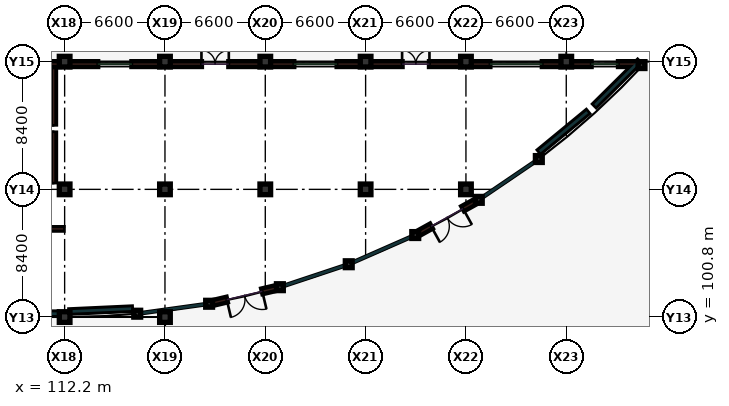
"""IFC4 building model, lengths in metres.
Left out: names, types, materials, properties, quantities, classifications, styles, units other than length and angle.
Written with IfcOpenShell. Run it as: python <this file> out.ifc"""

import sys

from ifc_helpers import new_model, si_unit, direction, frame, frame_2d, origin, origin_2d, place, context, subcontext, project, spatial, rectangle, extrude, element, fill, save


model = new_model("IFC4")
c1 = context("Model", 3, precision=1e-05, world=origin(), true_north=direction((0.0, 1.0)))
c2 = subcontext(c1, "Body", "Model", "MODEL_VIEW")
j1 = project(units=[si_unit("LENGTHUNIT", "METRE"), si_unit("PLANEANGLEUNIT", "RADIAN")], contexts=[c1])
p1 = place(None, origin())
s1 = spatial("IfcSite", under=j1, at=p1, CompositionType="ELEMENT")
p2 = place(p1, origin())
s2 = spatial("IfcBuilding", under=s1, at=p2, CompositionType="ELEMENT")
p3 = place(p2, origin())
s3 = spatial("IfcBuildingStorey", under=s2, at=p3, CompositionType="ELEMENT", Elevation=0.0)
for number, where, z_axis, x_axis in (
    (1, (112.2, 100.8, 0.0), (0.0, 0.0, 1.0), (1.0, 0.0, 0.0)),
    (2, (112.2, 109.2, 0.0), (0.0, 0.0, 1.0), (1.0, 0.0, 0.0)),
    (3, (112.2, 117.6, 0.0), (0.0, 0.0, 1.0), (1.0, 0.0, 0.0)),
    (4, (118.8, 100.8, 0.0), (0.0, 0.0, 1.0), (1.0, 0.0, 0.0)),
    (5, (118.8, 109.2, 0.0), (0.0, 0.0, 1.0), (1.0, 0.0, 0.0)),
    (6, (118.8, 117.6, 0.0), (0.0, 0.0, 1.0), (1.0, 0.0, 0.0)),
    (7, (125.4, 109.2, 0.0), (0.0, 0.0, 1.0), (1.0, 0.0, 0.0)),
    (8, (125.4, 117.6, 0.0), (0.0, 0.0, 1.0), (1.0, 0.0, 0.0)),
    (9, (132.0, 109.2, 0.0), (0.0, 0.0, 1.0), (1.0, 0.0, 0.0)),
    (10, (132.0, 117.6, 0.0), (0.0, 0.0, 1.0), (1.0, 0.0, 0.0)),
    (11, (138.6, 109.2, 0.0), (0.0, 0.0, 1.0), (1.0, 0.0, 0.0)),
    (12, (138.6, 117.6, 0.0), (0.0, 0.0, 1.0), (1.0, 0.0, 0.0)),
    (13, (145.2, 117.6, 0.0), (0.0, 0.0, 1.0), (1.0, 0.0, 0.0)),
):
    element("IfcColumn", number, at=place(p3, frame(where, z_axis=z_axis, x_axis=x_axis)), inside=s3, PredefinedType="COLUMN", context=c2, shape_type="SweptSolid", body=[
        extrude(rectangle(XDim=0.7, YDim=0.7, at=origin_2d()), origin(), (0.0, 0.0, 1.0), 5.4),
    ])
for number, where, z_axis, x_axis in (
    (14, (150.15, 117.375, 0.0), (0.0, 0.0, 1.0), (1.0, 0.0, 0.0)),
    (15, (116.975, 101.02, 0.0), (0.0, 0.0, 1.0), (1.0, 0.0, 0.0)),
    (16, (121.705, 101.675, 0.0), (0.0, 0.0, 1.0), (1.0, 0.0, 0.0)),
    (17, (126.36, 102.765, 0.0), (0.0, 0.0, 1.0), (1.0, 0.0, 0.0)),
    (18, (130.89, 104.275, 0.0), (0.0, 0.0, 1.0), (1.0, 0.0, 0.0)),
    (19, (135.265, 106.195, 0.0), (0.0, 0.0, 1.0), (1.0, 0.0, 0.0)),
    (20, (139.445, 108.51, 0.0), (0.0, 0.0, 1.0), (1.0, 0.0, 0.0)),
    (21, (143.395, 111.195, 0.0), (0.0, 0.0, 1.0), (1.0, 0.0, 0.0)),
):
    element("IfcColumn", number, at=place(p3, frame(where, z_axis=z_axis, x_axis=x_axis)), inside=s3, PredefinedType="COLUMN", context=c2, shape_type="SweptSolid", body=[
        extrude(rectangle(XDim=0.45, YDim=0.45, at=origin_2d()), origin(), (0.0, 0.0, 1.0), 5.4),
    ])
p4 = place(p3, frame((99.2, 106.6, 0.0), z_axis=(0.0, 0.0, 1.0), x_axis=(1.0, 0.0, 0.0)))
e22 = element("IfcWall", 22, at=p4, inside=s3, PredefinedType="PARTITIONING", context=c2, shape_type="SweptSolid", body=[
    extrude(rectangle(XDim=12.9, YDim=0.16, at=frame_2d((6.45, 0.0))), origin(), (0.0, 0.0, 1.0), 4.25),
])
p5 = place(p4, frame((4.2, 0.0, 0.0)))
e23 = element("IfcOpeningElement", 23, at=p5, cuts=e22, PredefinedType="OPENING", context=c2, shape_type="SweptSolid", body=[
    extrude(rectangle(XDim=1.05, YDim=2.15, at=frame_2d((0.525, 1.075))), frame((0.0, 0.09, 0.0), z_axis=(0.0, -1.0, 0.0), x_axis=(1.0, 0.0, 0.0)), (0.0, 0.0, 1.0), 0.18),
])
p6 = place(p3, frame((111.855, 117.44, 0.0), z_axis=(0.0, 0.0, 1.0), x_axis=(-1.0, 0.0, 0.0)))
e24 = element("IfcWall", 24, at=p6, inside=s3, PredefinedType="SOLIDWALL", context=c2, shape_type="SweptSolid", body=[
    extrude(rectangle(XDim=5.91, YDim=0.32, at=frame_2d((2.955, 0.0))), origin(), (0.0, 0.0, 1.0), 4.385),
])
p7 = place(p6, frame((3.15, 0.0, 0.95)))
e25 = element("IfcOpeningElement", 25, at=p7, cuts=e24, PredefinedType="OPENING", context=c2, shape_type="SweptSolid", body=[
    extrude(rectangle(XDim=1.95, YDim=1.55, at=frame_2d((0.975, 0.775))), frame((0.0, 0.17, 0.0), z_axis=(0.0, -1.0, 0.0), x_axis=(1.0, 0.0, 0.0)), (0.0, 0.0, 1.0), 0.34),
])
p8 = place(p3, frame((118.455, 117.44, 0.0), z_axis=(0.0, 0.0, 1.0), x_axis=(-1.0, 0.0, 0.0)))
e26 = element("IfcWall", 26, at=p8, inside=s3, PredefinedType="SOLIDWALL", context=c2, shape_type="SweptSolid", body=[
    extrude(rectangle(XDim=5.91, YDim=0.32, at=frame_2d((2.955, 0.0))), origin(), (0.0, 0.0, 1.0), 4.385),
])
p9 = place(p8, frame((1.83, 0.0, 0.95)))
e27 = element("IfcOpeningElement", 27, at=p9, cuts=e26, PredefinedType="OPENING", context=c2, shape_type="SweptSolid", body=[
    extrude(rectangle(XDim=2.25, YDim=1.55, at=frame_2d((1.125, 0.775))), frame((0.0, 0.17, 0.0), z_axis=(0.0, -1.0, 0.0), x_axis=(1.0, 0.0, 0.0)), (0.0, 0.0, 1.0), 0.34),
])
p10 = place(p3, frame((125.055, 117.44, 0.0), z_axis=(0.0, 0.0, 1.0), x_axis=(-1.0, 0.0, 0.0)))
e28 = element("IfcWall", 28, at=p10, inside=s3, PredefinedType="SOLIDWALL", context=c2, shape_type="SweptSolid", body=[
    extrude(rectangle(XDim=5.91, YDim=0.32, at=frame_2d((2.955, 0.0))), origin(), (0.0, 0.0, 1.0), 4.385),
])
p11 = place(p10, frame((2.055, 0.0, 0.0)))
e29 = element("IfcOpeningElement", 29, at=p11, cuts=e28, PredefinedType="OPENING", context=c2, shape_type="SweptSolid", body=[
    extrude(rectangle(XDim=1.8, YDim=2.2, at=frame_2d((0.9, 1.1))), frame((0.0, 0.17, 0.0), z_axis=(0.0, -1.0, 0.0), x_axis=(1.0, 0.0, 0.0)), (0.0, 0.0, 1.0), 0.34),
])
p12 = place(p3, frame((131.655, 117.44, 0.0), z_axis=(0.0, 0.0, 1.0), x_axis=(-1.0, 0.0, 0.0)))
e30 = element("IfcWall", 30, at=p12, inside=s3, PredefinedType="SOLIDWALL", context=c2, shape_type="SweptSolid", body=[
    extrude(rectangle(XDim=5.91, YDim=0.32, at=frame_2d((2.955, 0.0))), origin(), (0.0, 0.0, 1.0), 4.385),
])
p13 = place(p12, frame((1.53, 0.0, 0.95)))
e31 = element("IfcOpeningElement", 31, at=p13, cuts=e30, PredefinedType="OPENING", context=c2, shape_type="SweptSolid", body=[
    extrude(rectangle(XDim=2.85, YDim=1.65, at=frame_2d((1.425, 0.825))), frame((0.0, 0.17, 0.0), z_axis=(0.0, -1.0, 0.0), x_axis=(1.0, 0.0, 0.0)), (0.0, 0.0, 1.0), 0.34),
])
p14 = place(p3, frame((138.255, 117.44, 0.0), z_axis=(0.0, 0.0, 1.0), x_axis=(-1.0, 0.0, 0.0)))
e32 = element("IfcWall", 32, at=p14, inside=s3, PredefinedType="SOLIDWALL", context=c2, shape_type="SweptSolid", body=[
    extrude(rectangle(XDim=5.91, YDim=0.32, at=frame_2d((2.955, 0.0))), origin(), (0.0, 0.0, 1.0), 4.385),
])
p15 = place(p14, frame((2.055, 0.0, 0.0)))
e33 = element("IfcOpeningElement", 33, at=p15, cuts=e32, PredefinedType="OPENING", context=c2, shape_type="SweptSolid", body=[
    extrude(rectangle(XDim=1.8, YDim=2.2, at=frame_2d((0.9, 1.1))), frame((0.0, 0.17, 0.0), z_axis=(0.0, -1.0, 0.0), x_axis=(1.0, 0.0, 0.0)), (0.0, 0.0, 1.0), 0.34),
])
p16 = place(p3, frame((144.855, 117.44, 0.0), z_axis=(0.0, 0.0, 1.0), x_axis=(-1.0, 0.0, 0.0)))
e34 = element("IfcWall", 34, at=p16, inside=s3, PredefinedType="SOLIDWALL", context=c2, shape_type="SweptSolid", body=[
    extrude(rectangle(XDim=5.91, YDim=0.32, at=frame_2d((2.955, 0.0))), origin(), (0.0, 0.0, 1.0), 4.385),
])
p17 = place(p16, frame((1.23, 0.0, 0.95)))
e35 = element("IfcOpeningElement", 35, at=p17, cuts=e34, PredefinedType="OPENING", context=c2, shape_type="SweptSolid", body=[
    extrude(rectangle(XDim=3.45, YDim=1.7, at=frame_2d((1.725, 0.85))), frame((0.0, 0.17, 0.0), z_axis=(0.0, -1.0, 0.0), x_axis=(1.0, 0.0, 0.0)), (0.0, 0.0, 1.0), 0.34),
])
p18 = place(p3, frame((121.95, 101.73, 0.0), z_axis=(0.0, 0.0, 1.0), x_axis=(0.97341866493, 0.229032973097, 0.0)))
e36 = element("IfcWall", 36, at=p18, inside=s3, PredefinedType="SOLIDWALL", context=c2, shape_type="SweptSolid", body=[
    extrude(rectangle(XDim=4.279, YDim=0.32, at=frame_2d((2.139, 0.0))), origin(), (0.0, 0.0, 1.0), 5.04),
])
p19 = place(p18, frame((0.94, 0.0, 0.0)))
e37 = element("IfcOpeningElement", 37, at=p19, cuts=e36, PredefinedType="OPENING", context=c2, shape_type="SweptSolid", body=[
    extrude(rectangle(XDim=2.4, YDim=2.6, at=frame_2d((1.2, 1.3))), frame((0.0, 0.17, 0.0), z_axis=(0.0, -1.0, 0.0), x_axis=(1.0, 0.0, 0.0)), (0.0, 0.0, 1.0), 0.34),
])
p20 = place(p3, frame((135.485, 106.315, 0.0), z_axis=(0.0, 0.0, 1.0), x_axis=(0.874437155069, 0.485138806771, 0.0)))
e38 = element("IfcWall", 38, at=p20, inside=s3, PredefinedType="SOLIDWALL", context=c2, shape_type="SweptSolid", body=[
    extrude(rectangle(XDim=4.277, YDim=0.32, at=frame_2d((2.139, 0.0))), origin(), (0.0, 0.0, 1.0), 5.04),
])
p21 = place(p20, frame((0.94, 0.0, 0.0)))
e39 = element("IfcOpeningElement", 39, at=p21, cuts=e38, PredefinedType="OPENING", context=c2, shape_type="SweptSolid", body=[
    extrude(rectangle(XDim=2.4, YDim=2.6, at=frame_2d((1.2, 1.3))), frame((0.0, 0.17, 0.0), z_axis=(0.0, -1.0, 0.0), x_axis=(1.0, 0.0, 0.0)), (0.0, 0.0, 1.0), 0.34),
])
p22 = place(p3, frame((106.1, 101.02, 0.0), z_axis=(0.0, 0.0, 1.0), x_axis=(1.0, 0.0, 0.0)))
e40 = element("IfcWall", 40, at=p22, inside=s3, PredefinedType="SOLIDWALL", context=c2, shape_type="SweptSolid", body=[
    extrude(rectangle(XDim=5.6, YDim=0.22, at=frame_2d((2.8, 0.0))), origin(), (0.0, 0.0, 1.0), 0.85),
])
p23 = place(p3, frame((112.55, 101.165, 0.0), z_axis=(0.0, 0.0, 1.0), x_axis=(0.998952546821, 0.045758159928, 0.0)))
e41 = element("IfcWall", 41, at=p23, inside=s3, PredefinedType="SOLIDWALL", context=c2, shape_type="SweptSolid", body=[
    extrude(rectangle(XDim=4.044, YDim=0.22, at=frame_2d((2.022, 0.0))), origin(), (0.0, 0.0, 1.0), 0.85),
])
p24 = place(p3, frame((143.455, 111.7, 0.0), z_axis=(0.0, 0.0, 1.0), x_axis=(0.771757904354, 0.635916454471, 0.0)))
e42 = element("IfcWall", 42, at=p24, inside=s3, PredefinedType="SOLIDWALL", context=c2, shape_type="SweptSolid", body=[
    extrude(rectangle(XDim=4.049, YDim=0.22, at=frame_2d((2.025, 0.0))), origin(), (0.0, 0.0, 1.0), 0.85),
])
p25 = place(p3, frame((147.095, 114.74, 0.0), z_axis=(0.0, 0.0, 1.0), x_axis=(0.710175751401, 0.704024432902, 0.0)))
e43 = element("IfcWall", 43, at=p25, inside=s3, PredefinedType="SOLIDWALL", context=c2, shape_type="SweptSolid", body=[
    extrude(rectangle(XDim=4.048, YDim=0.22, at=frame_2d((2.024, 0.0))), origin(), (0.0, 0.0, 1.0), 0.85),
])
p26 = place(p3, frame((149.93, 117.44, 0.0), z_axis=(0.0, 0.0, 1.0), x_axis=(-1.0, 0.0, 0.0)))
e44 = element("IfcWall", 44, at=p26, inside=s3, PredefinedType="SOLIDWALL", context=c2, shape_type="SweptSolid", body=[
    extrude(rectangle(XDim=4.385, YDim=0.32, at=frame_2d((2.192, 0.0))), origin(), (0.0, 0.0, 1.0), 4.385),
])
p27 = place(p26, frame((1.295, 0.0, 0.95)))
e45 = element("IfcOpeningElement", 45, at=p27, cuts=e44, PredefinedType="OPENING", context=c2, shape_type="SweptSolid", body=[
    extrude(rectangle(XDim=1.8, YDim=1.6, at=frame_2d((0.9, 0.8))), frame((0.0, 0.17, 0.0), z_axis=(0.0, -1.0, 0.0), x_axis=(1.0, 0.0, 0.0)), (0.0, 0.0, 1.0), 0.34),
])
p28 = place(p3, frame((111.475, 109.7, 0.0), z_axis=(0.0, 0.0, 1.0), x_axis=(0.0, 1.0, 0.0)))
e46 = element("IfcWall", 46, at=p28, inside=s3, PredefinedType="SHEAR", context=c2, shape_type="SweptSolid", body=[
    extrude(rectangle(XDim=3.2, YDim=0.25, at=frame_2d((1.6, 0.0))), origin(), (0.0, 0.0, 1.0), 5.1),
])
p29 = place(p3, frame((111.475, 113.5, 0.0), z_axis=(0.0, 0.0, 1.0), x_axis=(0.0, 1.0, 0.0)))
e47 = element("IfcWall", 47, at=p29, inside=s3, PredefinedType="SHEAR", context=c2, shape_type="SweptSolid", body=[
    extrude(rectangle(XDim=3.6, YDim=0.25, at=frame_2d((1.8, 0.0))), origin(), (0.0, 0.0, 1.0), 5.1),
])
p30 = place(p9, origin())
e48 = element("IfcWindow", 48, at=p30, inside=s3, PartitioningType="SINGLE_PANEL", PredefinedType="WINDOW", context=c2, shape_type="SweptSolid", body=[
    extrude(rectangle(XDim=2.25, YDim=1.55, at=frame_2d((1.125, 0.775))), frame((0.0, 0.03, 0.0), z_axis=(0.0, -1.0, 0.0), x_axis=(1.0, 0.0, 0.0)), (0.0, 0.0, 1.0), 0.06),
])
fill(e27, e48)
p31 = place(p11, frame((1.8, 0.0, 0.0), z_axis=(0.0, 0.0, 1.0), x_axis=(-1.0, 0.0, 0.0)))
e49 = element("IfcDoor", 49, at=p31, inside=s3, OperationType="DOUBLE_DOOR_SINGLE_SWING", PredefinedType="DOOR", context=c2, shape_type="SweptSolid", body=[
    extrude(rectangle(XDim=1.8, YDim=2.2, at=frame_2d((0.9, 1.1))), frame((0.0, 0.025, 0.0), z_axis=(0.0, -1.0, 0.0), x_axis=(1.0, 0.0, 0.0)), (0.0, 0.0, 1.0), 0.05),
])
fill(e29, e49)
p32 = place(p13, origin())
e50 = element("IfcWindow", 50, at=p32, inside=s3, PartitioningType="SINGLE_PANEL", PredefinedType="WINDOW", context=c2, shape_type="SweptSolid", body=[
    extrude(rectangle(XDim=2.85, YDim=1.65, at=frame_2d((1.425, 0.825))), frame((0.0, 0.03, 0.0), z_axis=(0.0, -1.0, 0.0), x_axis=(1.0, 0.0, 0.0)), (0.0, 0.0, 1.0), 0.06),
])
fill(e31, e50)
p33 = place(p15, frame((1.8, 0.0, 0.0), z_axis=(0.0, 0.0, 1.0), x_axis=(-1.0, 0.0, 0.0)))
e51 = element("IfcDoor", 51, at=p33, inside=s3, OperationType="DOUBLE_DOOR_SINGLE_SWING", PredefinedType="DOOR", context=c2, shape_type="SweptSolid", body=[
    extrude(rectangle(XDim=1.8, YDim=2.2, at=frame_2d((0.9, 1.1))), frame((0.0, 0.025, 0.0), z_axis=(0.0, -1.0, 0.0), x_axis=(1.0, 0.0, 0.0)), (0.0, 0.0, 1.0), 0.05),
])
fill(e33, e51)
p34 = place(p17, origin())
e52 = element("IfcWindow", 52, at=p34, inside=s3, PartitioningType="SINGLE_PANEL", PredefinedType="WINDOW", context=c2, shape_type="SweptSolid", body=[
    extrude(rectangle(XDim=3.45, YDim=1.7, at=frame_2d((1.725, 0.85))), frame((0.0, 0.03, 0.0), z_axis=(0.0, -1.0, 0.0), x_axis=(1.0, 0.0, 0.0)), (0.0, 0.0, 1.0), 0.06),
])
fill(e35, e52)
p35 = place(p19, frame((2.4, 0.0, 0.0), z_axis=(0.0, 0.0, 1.0), x_axis=(-1.0, 0.0, 0.0)))
e53 = element("IfcDoor", 53, at=p35, inside=s3, OperationType="DOUBLE_DOOR_SINGLE_SWING", PredefinedType="DOOR", context=c2, shape_type="SweptSolid", body=[
    extrude(rectangle(XDim=2.4, YDim=2.6, at=frame_2d((1.2, 1.3))), frame((0.0, 0.025, 0.0), z_axis=(0.0, -1.0, 0.0), x_axis=(1.0, 0.0, 0.0)), (0.0, 0.0, 1.0), 0.05),
])
fill(e37, e53)
p36 = place(p21, frame((2.4, 0.0, 0.0), z_axis=(0.0, 0.0, 1.0), x_axis=(-1.0, 0.0, 0.0)))
e54 = element("IfcDoor", 54, at=p36, inside=s3, OperationType="DOUBLE_DOOR_SINGLE_SWING", PredefinedType="DOOR", context=c2, shape_type="SweptSolid", body=[
    extrude(rectangle(XDim=2.4, YDim=2.6, at=frame_2d((1.2, 1.3))), frame((0.0, 0.025, 0.0), z_axis=(0.0, -1.0, 0.0), x_axis=(1.0, 0.0, 0.0)), (0.0, 0.0, 1.0), 0.05),
])
fill(e39, e54)
p37 = place(p27, origin())
e55 = element("IfcWindow", 55, at=p37, inside=s3, PartitioningType="SINGLE_PANEL", PredefinedType="WINDOW", context=c2, shape_type="SweptSolid", body=[
    extrude(rectangle(XDim=1.8, YDim=1.6, at=frame_2d((0.9, 0.8))), frame((0.0, 0.03, 0.0), z_axis=(0.0, -1.0, 0.0), x_axis=(1.0, 0.0, 0.0)), (0.0, 0.0, 1.0), 0.06),
])
fill(e45, e55)
save(model, sys.argv[1])
